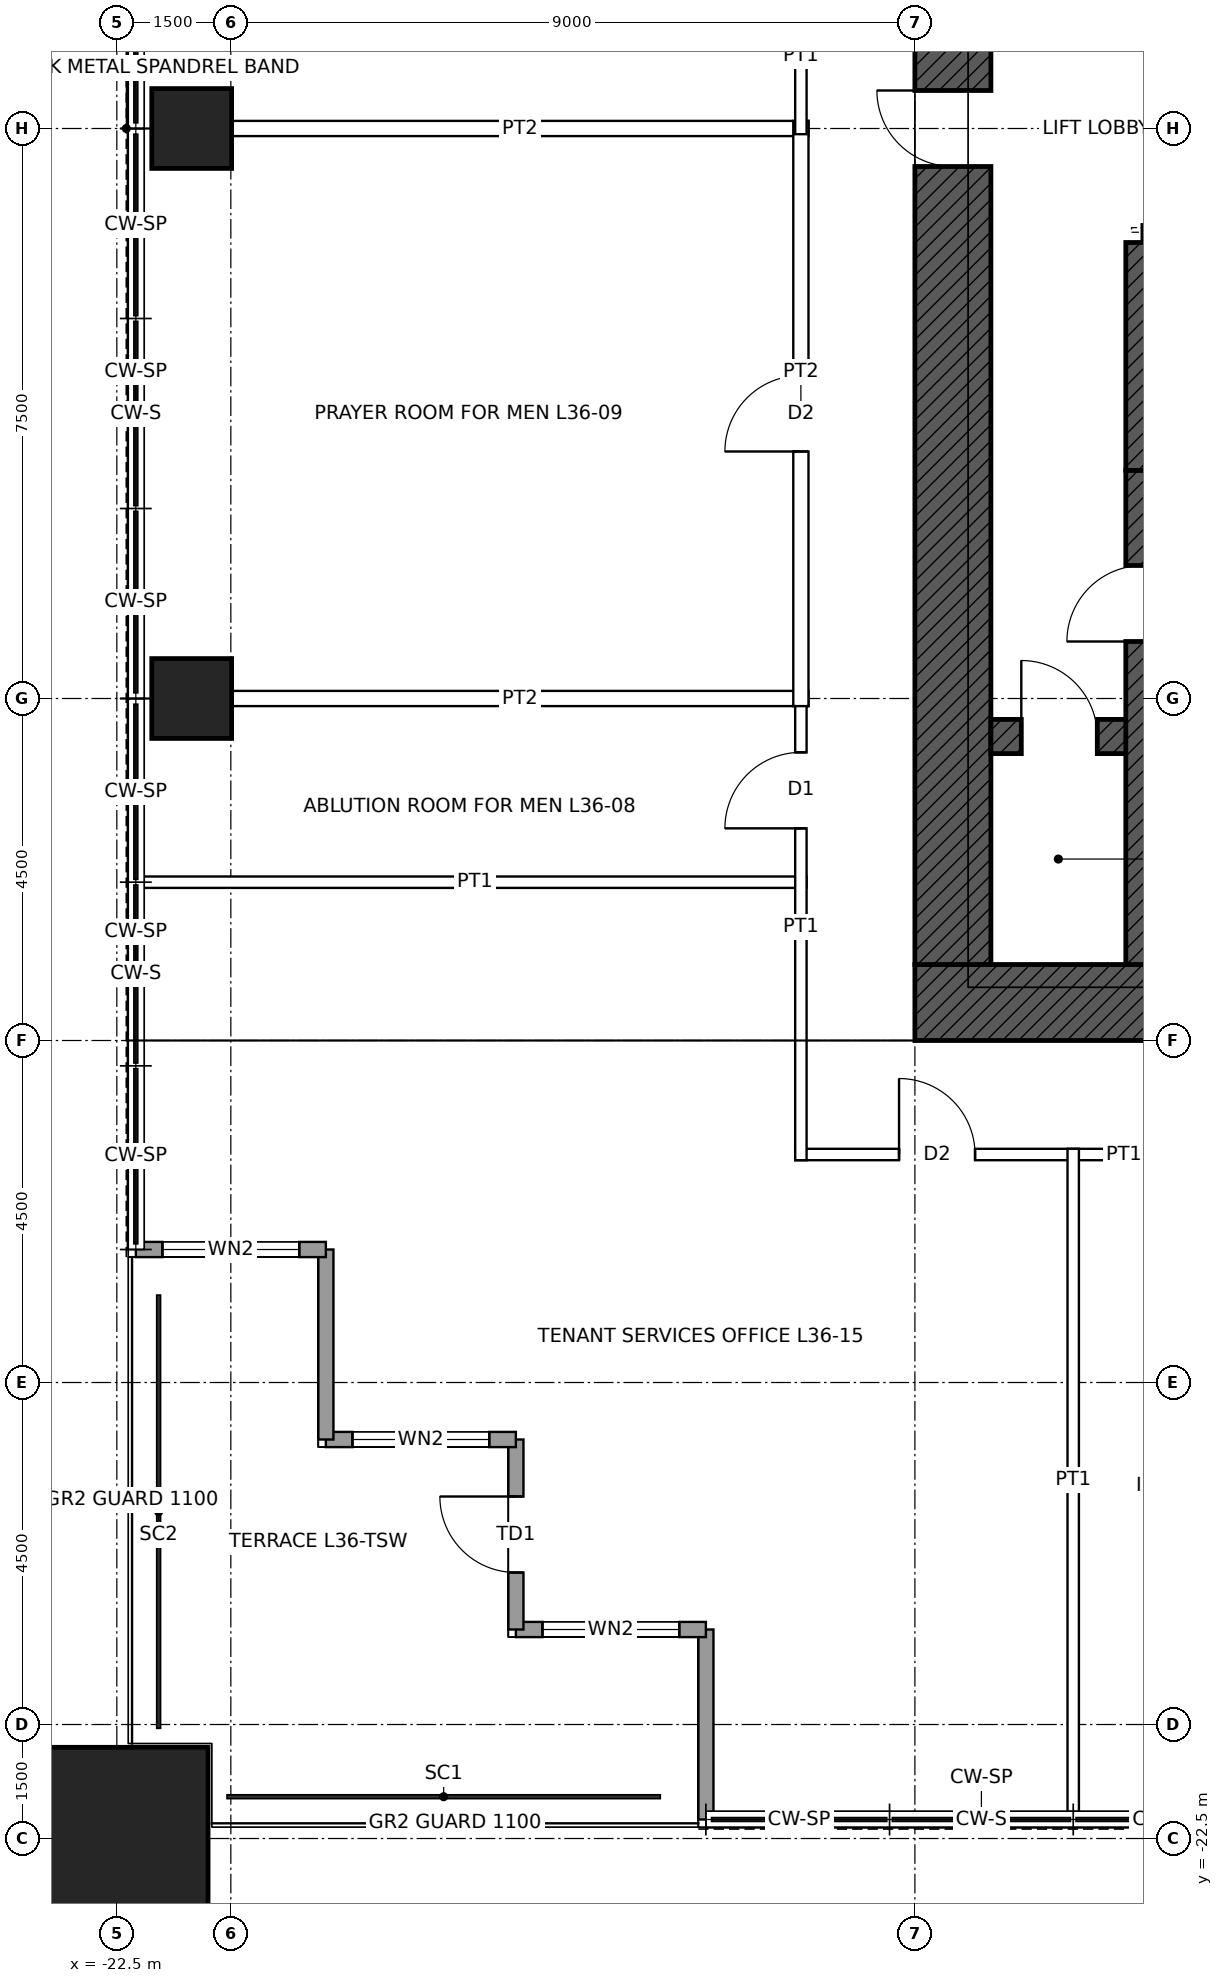
"""IFC4 building model, lengths in metres.
Left out: names, types, materials, properties, quantities, classifications, styles, units other than length and angle.
Written with IfcOpenShell. Run it as: python <this file> out.ifc"""

import sys

from ifc_helpers import new_model, si_unit, direction, frame, frame_2d, origin, origin_2d, place, context, subcontext, project, spatial, rectangle, hollow_rectangle, extrude, element, fill, save


model = new_model("IFC4")
c1 = context("Model", 3, precision=1e-05, world=origin(), true_north=direction((0.0, 1.0)))
c2 = subcontext(c1, "Body", "Model", "MODEL_VIEW")
j1 = project(units=[si_unit("LENGTHUNIT", "METRE"), si_unit("PLANEANGLEUNIT", "RADIAN")], contexts=[c1])
p1 = place(None, origin())
s1 = spatial("IfcSite", under=j1, at=p1, CompositionType="ELEMENT")
p2 = place(p1, origin())
s2 = spatial("IfcBuilding", under=s1, at=p2, CompositionType="ELEMENT")
p3 = place(p2, frame((0.0, 0.0, 177.9)))
s3 = spatial("IfcBuildingStorey", under=s2, at=p3, CompositionType="ELEMENT", Elevation=177.9)
p4 = place(p3, frame((-22.5, -22.5, 0.0), z_axis=(0.0, 0.0, 1.0), x_axis=(1.0, 0.0, 0.0)))
e1 = element("IfcColumn", 1, at=p4, inside=s3, PredefinedType="COLUMN", context=c2, shape_type="SweptSolid", body=[
    extrude(hollow_rectangle(XDim=2.4, YDim=2.4, WallThickness=0.12, at=origin_2d()), origin(), (0.0, 0.0, 1.0), 4.0),
])
p5 = place(p3, frame((-21.515, -7.5, 0.0), z_axis=(0.0, 0.0, 1.0), x_axis=(1.0, 0.0, 0.0)))
e2 = element("IfcColumn", 2, at=p5, inside=s3, PredefinedType="COLUMN", context=c2, shape_type="SweptSolid", body=[
    extrude(hollow_rectangle(XDim=1.05, YDim=1.05, WallThickness=0.075, at=origin_2d()), origin(), (0.0, 0.0, 1.0), 4.0),
])
p6 = place(p3, frame((-21.515, 0.0, 0.0), z_axis=(0.0, 0.0, 1.0), x_axis=(1.0, 0.0, 0.0)))
e3 = element("IfcColumn", 3, at=p6, inside=s3, PredefinedType="COLUMN", context=c2, shape_type="SweptSolid", body=[
    extrude(hollow_rectangle(XDim=1.05, YDim=1.05, WallThickness=0.07, at=origin_2d()), origin(), (0.0, 0.0, 1.0), 4.0),
])
p7 = place(p3, frame((12.0, -11.5, 0.0), z_axis=(0.0, 0.0, 1.0), x_axis=(-1.0, 0.0, 0.0)))
e4 = element("IfcWall", 4, at=p7, inside=s3, PredefinedType="SHEAR", context=c2, shape_type="SweptSolid", body=[
    extrude(rectangle(XDim=24.0, YDim=1.0, at=frame_2d((12.0, 0.0))), origin(), (0.0, 0.0, 1.0), 4.0),
])
p8 = place(p7, frame((11.5, 0.0, 0.0)))
e5 = element("IfcOpeningElement", 5, at=p8, cuts=e4, PredefinedType="OPENING", context=c2, shape_type="SweptSolid", body=[
    extrude(rectangle(XDim=1.0, YDim=2.1, at=frame_2d((0.5, 1.05))), frame((0.0, 0.51, 0.0), z_axis=(0.0, -1.0, 0.0), x_axis=(1.0, 0.0, 0.0)), (0.0, 0.0, 1.0), 1.02),
])
p9 = place(p7, frame((1.0, 0.0, 0.0)))
e6 = element("IfcOpeningElement", 6, at=p9, cuts=e4, PredefinedType="OPENING", context=c2, shape_type="SweptSolid", body=[
    extrude(rectangle(XDim=1.0, YDim=2.4, at=frame_2d((0.5, 1.2))), frame((0.0, 0.51, 0.0), z_axis=(0.0, -1.0, 0.0), x_axis=(1.0, 0.0, 0.0)), (0.0, 0.0, 1.0), 1.02),
])
p10 = place(p3, frame((-11.5, -11.0, 0.0), z_axis=(0.0, 0.0, 1.0), x_axis=(0.0, 1.0, 0.0)))
e7 = element("IfcWall", 7, at=p10, inside=s3, PredefinedType="SHEAR", context=c2, shape_type="SweptSolid", body=[
    extrude(rectangle(XDim=22.0, YDim=1.0, at=frame_2d((11.0, 0.0))), origin(), (0.0, 0.0, 1.0), 4.0),
])
p11 = place(p10, frame((10.5, 0.0, 0.0)))
e8 = element("IfcOpeningElement", 8, at=p11, cuts=e7, PredefinedType="OPENING", context=c2, shape_type="SweptSolid", body=[
    extrude(rectangle(XDim=1.0, YDim=2.4, at=frame_2d((0.5, 1.2))), frame((0.0, 0.51, 0.0), z_axis=(0.0, -1.0, 0.0), x_axis=(1.0, 0.0, 0.0)), (0.0, 0.0, 1.0), 1.02),
])
p12 = place(p3, frame((-9.0, -1.5, 0.0), z_axis=(0.0, 0.0, 1.0), x_axis=(1.0, 0.0, 0.0)))
e9 = element("IfcWall", 9, at=p12, inside=s3, PredefinedType="SHEAR", context=c2, shape_type="SweptSolid", body=[
    extrude(rectangle(XDim=18.0, YDim=0.45, at=frame_2d((9.0, 0.0))), origin(), (0.0, 0.0, 1.0), 4.0),
])
p13 = place(p12, frame((0.95, 0.0, 0.0)))
e10 = element("IfcOpeningElement", 10, at=p13, cuts=e9, PredefinedType="OPENING", context=c2, shape_type="SweptSolid", body=[
    extrude(rectangle(XDim=1.1, YDim=2.1, at=frame_2d((0.55, 1.05))), frame((0.0, 0.235, 0.0), z_axis=(0.0, -1.0, 0.0), x_axis=(1.0, 0.0, 0.0)), (0.0, 0.0, 1.0), 0.47),
])
p14 = place(p12, frame((3.95, 0.0, 0.0)))
e11 = element("IfcOpeningElement", 11, at=p14, cuts=e9, PredefinedType="OPENING", context=c2, shape_type="SweptSolid", body=[
    extrude(rectangle(XDim=1.1, YDim=2.1, at=frame_2d((0.55, 1.05))), frame((0.0, 0.235, 0.0), z_axis=(0.0, -1.0, 0.0), x_axis=(1.0, 0.0, 0.0)), (0.0, 0.0, 1.0), 0.47),
])
p15 = place(p12, frame((6.95, 0.0, 0.0)))
e12 = element("IfcOpeningElement", 12, at=p15, cuts=e9, PredefinedType="OPENING", context=c2, shape_type="SweptSolid", body=[
    extrude(rectangle(XDim=1.1, YDim=2.1, at=frame_2d((0.55, 1.05))), frame((0.0, 0.235, 0.0), z_axis=(0.0, -1.0, 0.0), x_axis=(1.0, 0.0, 0.0)), (0.0, 0.0, 1.0), 0.47),
])
p16 = place(p3, frame((-9.0, -4.5, 0.0), z_axis=(0.0, 0.0, 1.0), x_axis=(1.0, 0.0, 0.0)))
e13 = element("IfcWall", 13, at=p16, inside=s3, PredefinedType="SHEAR", context=c2, shape_type="SweptSolid", body=[
    extrude(rectangle(XDim=18.0, YDim=0.45, at=frame_2d((9.0, 0.0))), origin(), (0.0, 0.0, 1.0), 4.0),
])
p17 = place(p3, frame((-11.0, -8.0, 0.0), z_axis=(0.0, 0.0, 1.0), x_axis=(1.0, 0.0, 0.0)))
e14 = element("IfcWall", 14, at=p17, inside=s3, PredefinedType="SHEAR", context=c2, shape_type="SweptSolid", body=[
    extrude(rectangle(XDim=2.0, YDim=0.45, at=frame_2d((1.0, 0.0))), origin(), (0.0, 0.0, 1.0), 4.0),
])
p18 = place(p17, frame((0.4, 0.0, 0.0)))
e15 = element("IfcOpeningElement", 15, at=p18, cuts=e14, PredefinedType="OPENING", context=c2, shape_type="SweptSolid", body=[
    extrude(rectangle(XDim=1.0, YDim=2.1, at=frame_2d((0.5, 1.05))), frame((0.0, 0.235, 0.0), z_axis=(0.0, -1.0, 0.0), x_axis=(1.0, 0.0, 0.0)), (0.0, 0.0, 1.0), 0.47),
])
p19 = place(p3, frame((-9.0, -4.5, 0.0), z_axis=(0.0, 0.0, 1.0), x_axis=(0.0, 1.0, 0.0)))
e16 = element("IfcWall", 16, at=p19, inside=s3, PredefinedType="SHEAR", context=c2, shape_type="SweptSolid", body=[
    extrude(rectangle(XDim=3.0, YDim=0.45, at=frame_2d((1.5, 0.0))), origin(), (0.0, 0.0, 1.0), 4.0),
])
p20 = place(p3, frame((-9.0, -11.0, 0.0), z_axis=(0.0, 0.0, 1.0), x_axis=(0.0, 1.0, 0.0)))
e17 = element("IfcWall", 17, at=p20, inside=s3, PredefinedType="SHEAR", context=c2, shape_type="SweptSolid", body=[
    extrude(rectangle(XDim=6.5, YDim=0.45, at=frame_2d((3.25, 0.0))), origin(), (0.0, 0.0, 1.0), 4.0),
])
p21 = place(p20, frame((4.25, 0.0, 0.0)))
e18 = element("IfcOpeningElement", 18, at=p21, cuts=e17, PredefinedType="OPENING", context=c2, shape_type="SweptSolid", body=[
    extrude(rectangle(XDim=1.0, YDim=2.1, at=frame_2d((0.5, 1.05))), frame((0.0, 0.235, 0.0), z_axis=(0.0, -1.0, 0.0), x_axis=(1.0, 0.0, 0.0)), (0.0, 0.0, 1.0), 0.47),
])
p22 = place(p3, frame((-14.75, -22.25, 0.0), z_axis=(0.0, 0.0, 1.0), x_axis=(0.0, 1.0, 0.0)))
e19 = element("IfcWall", 19, at=p22, inside=s3, PredefinedType="SOLIDWALL", context=c2, shape_type="SweptSolid", body=[
    extrude(rectangle(XDim=2.5, YDim=0.2, at=frame_2d((1.25, 0.0))), origin(), (0.0, 0.0, 1.0), 3.85),
])
p23 = place(p3, frame((-14.75, -19.75, 0.0), z_axis=(0.0, 0.0, 1.0), x_axis=(-1.0, 0.0, 0.0)))
e20 = element("IfcWall", 20, at=p23, inside=s3, PredefinedType="SOLIDWALL", context=c2, shape_type="SweptSolid", body=[
    extrude(rectangle(XDim=2.5, YDim=0.2, at=frame_2d((1.25, 0.0))), origin(), (0.0, 0.0, 1.0), 3.85),
])
p24 = place(p23, frame((0.35, 0.0, 0.3)))
e21 = element("IfcOpeningElement", 21, at=p24, cuts=e20, PredefinedType="OPENING", context=c2, shape_type="SweptSolid", body=[
    extrude(rectangle(XDim=1.8, YDim=2.4, at=frame_2d((0.9, 1.2))), frame((0.0, 0.11, 0.0), z_axis=(0.0, -1.0, 0.0), x_axis=(1.0, 0.0, 0.0)), (0.0, 0.0, 1.0), 0.22),
])
p25 = place(p3, frame((-17.25, -19.75, 0.0), z_axis=(0.0, 0.0, 1.0), x_axis=(0.0, 1.0, 0.0)))
e22 = element("IfcWall", 22, at=p25, inside=s3, PredefinedType="SOLIDWALL", context=c2, shape_type="SweptSolid", body=[
    extrude(rectangle(XDim=2.5, YDim=0.2, at=frame_2d((1.25, 0.0))), origin(), (0.0, 0.0, 1.0), 3.85),
])
p26 = place(p25, frame((0.75, 0.0, 0.0)))
e23 = element("IfcOpeningElement", 23, at=p26, cuts=e22, PredefinedType="OPENING", context=c2, shape_type="SweptSolid", body=[
    extrude(rectangle(XDim=1.0, YDim=2.4, at=frame_2d((0.5, 1.2))), frame((0.0, 0.11, 0.0), z_axis=(0.0, -1.0, 0.0), x_axis=(1.0, 0.0, 0.0)), (0.0, 0.0, 1.0), 0.22),
])
p27 = place(p3, frame((-17.25, -17.25, 0.0), z_axis=(0.0, 0.0, 1.0), x_axis=(-1.0, 0.0, 0.0)))
e24 = element("IfcWall", 24, at=p27, inside=s3, PredefinedType="SOLIDWALL", context=c2, shape_type="SweptSolid", body=[
    extrude(rectangle(XDim=2.5, YDim=0.2, at=frame_2d((1.25, 0.0))), origin(), (0.0, 0.0, 1.0), 3.85),
])
p28 = place(p27, frame((0.35, 0.0, 0.3)))
e25 = element("IfcOpeningElement", 25, at=p28, cuts=e24, PredefinedType="OPENING", context=c2, shape_type="SweptSolid", body=[
    extrude(rectangle(XDim=1.8, YDim=2.4, at=frame_2d((0.9, 1.2))), frame((0.0, 0.11, 0.0), z_axis=(0.0, -1.0, 0.0), x_axis=(1.0, 0.0, 0.0)), (0.0, 0.0, 1.0), 0.22),
])
p29 = place(p3, frame((-19.75, -17.25, 0.0), z_axis=(0.0, 0.0, 1.0), x_axis=(0.0, 1.0, 0.0)))
e26 = element("IfcWall", 26, at=p29, inside=s3, PredefinedType="SOLIDWALL", context=c2, shape_type="SweptSolid", body=[
    extrude(rectangle(XDim=2.5, YDim=0.2, at=frame_2d((1.25, 0.0))), origin(), (0.0, 0.0, 1.0), 3.85),
])
p30 = place(p3, frame((-19.75, -14.75, 0.0), z_axis=(0.0, 0.0, 1.0), x_axis=(-1.0, 0.0, 0.0)))
e27 = element("IfcWall", 27, at=p30, inside=s3, PredefinedType="SOLIDWALL", context=c2, shape_type="SweptSolid", body=[
    extrude(rectangle(XDim=2.5, YDim=0.2, at=frame_2d((1.25, 0.0))), origin(), (0.0, 0.0, 1.0), 3.85),
])
p31 = place(p30, frame((0.35, 0.0, 0.3)))
e28 = element("IfcOpeningElement", 28, at=p31, cuts=e27, PredefinedType="OPENING", context=c2, shape_type="SweptSolid", body=[
    extrude(rectangle(XDim=1.8, YDim=2.4, at=frame_2d((0.9, 1.2))), frame((0.0, 0.11, 0.0), z_axis=(0.0, -1.0, 0.0), x_axis=(1.0, 0.0, 0.0)), (0.0, 0.0, 1.0), 0.22),
])
p32 = place(p3, frame((-13.575, -13.5, 0.0), z_axis=(0.0, 0.0, 1.0), x_axis=(1.0, 0.0, 0.0)))
e29 = element("IfcWall", 29, at=p32, inside=s3, PredefinedType="PARTITIONING", context=c2, shape_type="SweptSolid", body=[
    extrude(rectangle(XDim=8.65, YDim=0.15, at=frame_2d((4.325, 0.0))), origin(), (0.0, 0.0, 1.0), 3.85),
])
p33 = place(p32, frame((5.616, 0.0, 0.0)))
e30 = element("IfcOpeningElement", 30, at=p33, cuts=e29, PredefinedType="OPENING", context=c2, shape_type="SweptSolid", body=[
    extrude(rectangle(XDim=1.0, YDim=2.1, at=frame_2d((0.5, 1.05))), frame((0.0, 0.085, 0.0), z_axis=(0.0, -1.0, 0.0), x_axis=(1.0, 0.0, 0.0)), (0.0, 0.0, 1.0), 0.17),
])
p34 = place(p32, frame((1.366, 0.0, 0.0)))
e31 = element("IfcOpeningElement", 31, at=p34, cuts=e29, PredefinedType="OPENING", context=c2, shape_type="SweptSolid", body=[
    extrude(rectangle(XDim=1.0, YDim=2.1, at=frame_2d((0.5, 1.05))), frame((0.0, 0.085, 0.0), z_axis=(0.0, -1.0, 0.0), x_axis=(1.0, 0.0, 0.0)), (0.0, 0.0, 1.0), 0.17),
])
p35 = place(p3, frame((-22.15, -9.917, 0.0), z_axis=(0.0, 0.0, 1.0), x_axis=(1.0, 0.0, 0.0)))
e32 = element("IfcWall", 32, at=p35, inside=s3, PredefinedType="PARTITIONING", context=c2, shape_type="SweptSolid", body=[
    extrude(rectangle(XDim=8.725, YDim=0.15, at=frame_2d((4.362, 0.0))), origin(), (0.0, 0.0, 1.0), 3.85),
])
for number, where, z_axis, x_axis in (
    (33, (-20.99, -7.5, 0.0), (0.0, 0.0, 1.0), (1.0, 0.0, 0.0)),
    (34, (-20.99, 0.0, 0.0), (0.0, 0.0, 1.0), (1.0, 0.0, 0.0)),
):
    element("IfcWall", number, at=place(p3, frame(where, z_axis=z_axis, x_axis=x_axis)), inside=s3, PredefinedType="PARTITIONING", context=c2, shape_type="SweptSolid", body=[
        extrude(rectangle(XDim=7.59, YDim=0.2, at=frame_2d((3.795, 0.0))), origin(), (0.0, 0.0, 1.0), 3.238),
    ])
p36 = place(p3, frame((-13.5, -13.575, 0.0), z_axis=(0.0, 0.0, 1.0), x_axis=(0.0, 1.0, 0.0)))
e35 = element("IfcWall", 35, at=p36, inside=s3, PredefinedType="PARTITIONING", context=c2, shape_type="SweptSolid", body=[
    extrude(rectangle(XDim=6.15, YDim=0.15, at=frame_2d((3.075, 0.0))), origin(), (0.0, 0.0, 1.0), 3.85),
])
p37 = place(p36, frame((4.366, 0.0, 0.0)))
e36 = element("IfcOpeningElement", 36, at=p37, cuts=e35, PredefinedType="OPENING", context=c2, shape_type="SweptSolid", body=[
    extrude(rectangle(XDim=1.0, YDim=2.1, at=frame_2d((0.5, 1.05))), frame((0.0, 0.085, 0.0), z_axis=(0.0, -1.0, 0.0), x_axis=(1.0, 0.0, 0.0)), (0.0, 0.0, 1.0), 0.17),
])
p38 = place(p3, frame((-13.5, -7.6, 0.0), z_axis=(0.0, 0.0, 1.0), x_axis=(0.0, 1.0, 0.0)))
e37 = element("IfcWall", 37, at=p38, inside=s3, PredefinedType="PARTITIONING", context=c2, shape_type="SweptSolid", body=[
    extrude(rectangle(XDim=7.7, YDim=0.2, at=frame_2d((3.85, 0.0))), origin(), (0.0, 0.0, 1.0), 3.85),
])
p39 = place(p38, frame((3.35, 0.0, 0.0)))
e38 = element("IfcOpeningElement", 38, at=p39, cuts=e37, PredefinedType="OPENING", context=c2, shape_type="SweptSolid", body=[
    extrude(rectangle(XDim=1.0, YDim=2.1, at=frame_2d((0.5, 1.05))), frame((0.0, 0.11, 0.0), z_axis=(0.0, -1.0, 0.0), x_axis=(1.0, 0.0, 0.0)), (0.0, 0.0, 1.0), 0.22),
])
p40 = place(p3, frame((-13.5, -0.075, 0.0), z_axis=(0.0, 0.0, 1.0), x_axis=(0.0, 1.0, 0.0)))
e39 = element("IfcWall", 39, at=p40, inside=s3, PredefinedType="PARTITIONING", context=c2, shape_type="SweptSolid", body=[
    extrude(rectangle(XDim=2.65, YDim=0.15, at=frame_2d((1.325, 0.0))), origin(), (0.0, 0.0, 1.0), 3.85),
])
p41 = place(p40, frame((1.175, 0.0, 0.0)))
e40 = element("IfcOpeningElement", 40, at=p41, cuts=e39, PredefinedType="OPENING", context=c2, shape_type="SweptSolid", body=[
    extrude(rectangle(XDim=1.0, YDim=2.1, at=frame_2d((0.5, 1.05))), frame((0.0, 0.085, 0.0), z_axis=(0.0, -1.0, 0.0), x_axis=(1.0, 0.0, 0.0)), (0.0, 0.0, 1.0), 0.17),
])
p42 = place(p3, frame((-9.917, -22.15, 0.0), z_axis=(0.0, 0.0, 1.0), x_axis=(0.0, 1.0, 0.0)))
e41 = element("IfcWall", 41, at=p42, inside=s3, PredefinedType="PARTITIONING", context=c2, shape_type="SweptSolid", body=[
    extrude(rectangle(XDim=8.725, YDim=0.15, at=frame_2d((4.362, 0.0))), origin(), (0.0, 0.0, 1.0), 3.85),
])
p43 = place(p24, origin())
e42 = element("IfcWindow", 42, at=p43, inside=s3, PartitioningType="SINGLE_PANEL", PredefinedType="WINDOW", context=c2, shape_type="SweptSolid", body=[
    extrude(rectangle(XDim=1.8, YDim=2.4, at=frame_2d((0.9, 1.2))), frame((0.0, 0.03, 0.0), z_axis=(0.0, -1.0, 0.0), x_axis=(1.0, 0.0, 0.0)), (0.0, 0.0, 1.0), 0.06),
])
fill(e21, e42)
p44 = place(p26, origin())
e43 = element("IfcDoor", 43, at=p44, inside=s3, OperationType="SINGLE_SWING_RIGHT", PredefinedType="DOOR", context=c2, shape_type="SweptSolid", body=[
    extrude(rectangle(XDim=1.0, YDim=2.4, at=frame_2d((0.5, 1.2))), frame((0.0, 0.025, 0.0), z_axis=(0.0, -1.0, 0.0), x_axis=(1.0, 0.0, 0.0)), (0.0, 0.0, 1.0), 0.05),
])
fill(e23, e43)
p45 = place(p28, origin())
e44 = element("IfcWindow", 44, at=p45, inside=s3, PartitioningType="SINGLE_PANEL", PredefinedType="WINDOW", context=c2, shape_type="SweptSolid", body=[
    extrude(rectangle(XDim=1.8, YDim=2.4, at=frame_2d((0.9, 1.2))), frame((0.0, 0.03, 0.0), z_axis=(0.0, -1.0, 0.0), x_axis=(1.0, 0.0, 0.0)), (0.0, 0.0, 1.0), 0.06),
])
fill(e25, e44)
p46 = place(p31, origin())
e45 = element("IfcWindow", 45, at=p46, inside=s3, PartitioningType="SINGLE_PANEL", PredefinedType="WINDOW", context=c2, shape_type="SweptSolid", body=[
    extrude(rectangle(XDim=1.8, YDim=2.4, at=frame_2d((0.9, 1.2))), frame((0.0, 0.03, 0.0), z_axis=(0.0, -1.0, 0.0), x_axis=(1.0, 0.0, 0.0)), (0.0, 0.0, 1.0), 0.06),
])
fill(e28, e45)
p47 = place(p11, origin())
e46 = element("IfcDoor", 46, at=p47, inside=s3, OperationType="SINGLE_SWING_RIGHT", PredefinedType="DOOR", context=c2, shape_type="SweptSolid", body=[
    extrude(rectangle(XDim=1.0, YDim=2.4, at=frame_2d((0.5, 1.2))), frame((0.0, 0.485, 0.0), z_axis=(0.0, -1.0, 0.0), x_axis=(1.0, 0.0, 0.0)), (0.0, 0.0, 1.0), 0.05),
])
fill(e8, e46)
p48 = place(p21, origin())
e47 = element("IfcDoor", 47, at=p48, inside=s3, OperationType="SINGLE_SWING_LEFT", PredefinedType="DOOR", context=c2, shape_type="SweptSolid", body=[
    extrude(rectangle(XDim=1.0, YDim=2.1, at=frame_2d((0.5, 1.05))), frame((0.0, 0.025, 0.0), z_axis=(0.0, -1.0, 0.0), x_axis=(1.0, 0.0, 0.0)), (0.0, 0.0, 1.0), 0.05),
])
fill(e18, e47)
p49 = place(p18, origin())
e48 = element("IfcDoor", 48, at=p49, inside=s3, OperationType="SINGLE_SWING_LEFT", PredefinedType="DOOR", context=c2, shape_type="SweptSolid", body=[
    extrude(rectangle(XDim=1.0, YDim=2.1, at=frame_2d((0.5, 1.05))), frame((0.0, 0.025, 0.0), z_axis=(0.0, -1.0, 0.0), x_axis=(1.0, 0.0, 0.0)), (0.0, 0.0, 1.0), 0.05),
])
fill(e15, e48)
p50 = place(p37, origin())
e49 = element("IfcDoor", 49, at=p50, inside=s3, OperationType="SINGLE_SWING_LEFT", PredefinedType="DOOR", context=c2, shape_type="SweptSolid", body=[
    extrude(rectangle(XDim=1.0, YDim=2.1, at=frame_2d((0.5, 1.05))), frame((0.0, 0.025, 0.0), z_axis=(0.0, -1.0, 0.0), x_axis=(1.0, 0.0, 0.0)), (0.0, 0.0, 1.0), 0.05),
])
fill(e36, e49)
p51 = place(p39, origin())
e50 = element("IfcDoor", 50, at=p51, inside=s3, OperationType="SINGLE_SWING_LEFT", PredefinedType="DOOR", context=c2, shape_type="SweptSolid", body=[
    extrude(rectangle(XDim=1.0, YDim=2.1, at=frame_2d((0.5, 1.05))), frame((0.0, 0.025, 0.0), z_axis=(0.0, -1.0, 0.0), x_axis=(1.0, 0.0, 0.0)), (0.0, 0.0, 1.0), 0.05),
])
fill(e38, e50)
p52 = place(p34, origin())
e51 = element("IfcDoor", 51, at=p52, inside=s3, OperationType="SINGLE_SWING_LEFT", PredefinedType="DOOR", context=c2, shape_type="SweptSolid", body=[
    extrude(rectangle(XDim=1.0, YDim=2.1, at=frame_2d((0.5, 1.05))), frame((0.0, 0.025, 0.0), z_axis=(0.0, -1.0, 0.0), x_axis=(1.0, 0.0, 0.0)), (0.0, 0.0, 1.0), 0.05),
])
fill(e31, e51)
save(model, sys.argv[1])
